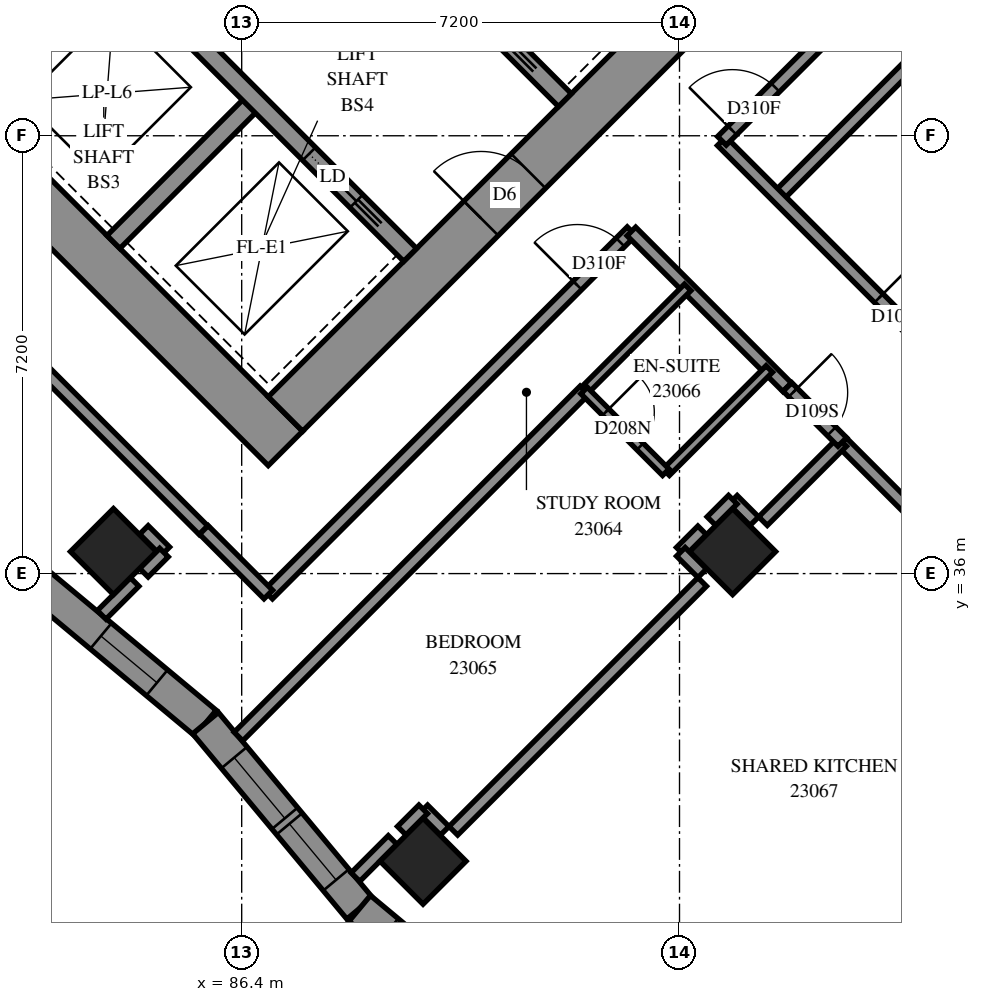
"""IFC4 building model, lengths in metres.
Left out: names, types, materials, properties, quantities, classifications, styles, units other than length and angle.
Written with IfcOpenShell. Run it as: python <this file> out.ifc"""

import sys

from ifc_helpers import new_model, si_unit, direction, frame, frame_2d, origin, origin_2d, place, context, subcontext, project, spatial, polyline, rectangle, outline, extrude, element, fill, save


model = new_model("IFC4")
c1 = context("Model", 3, precision=1e-05, world=origin(), true_north=direction((0.0, 1.0)))
c2 = subcontext(c1, "Body", "Model", "MODEL_VIEW")
j1 = project(units=[si_unit("LENGTHUNIT", "METRE"), si_unit("PLANEANGLEUNIT", "RADIAN")], contexts=[c1])
p1 = place(None, origin())
s1 = spatial("IfcSite", under=j1, at=p1, CompositionType="ELEMENT")
p2 = place(p1, origin())
s2 = spatial("IfcBuilding", under=s1, at=p2, CompositionType="ELEMENT")
p3 = place(p2, frame((0.0, 0.0, 88.0)))
s3 = spatial("IfcBuildingStorey", under=s2, at=p3, CompositionType="ELEMENT", Elevation=88.0)
for number, where, z_axis, x_axis in (
    (1, (84.291, 36.362, 0.0), (0.0, 0.0, 1.0), (0.707, -0.707, 0.0)),
    (2, (94.474, 36.362, 0.0), (0.0, 0.0, 1.0), (0.707, -0.707, 0.0)),
    (3, (89.382, 31.271, 0.0), (0.0, 0.0, 1.0), (0.707, -0.707, 0.0)),
):
    element("IfcColumn", number, at=place(p3, frame(where, z_axis=z_axis, x_axis=x_axis)), inside=s3, PredefinedType="COLUMN", context=c2, shape_type="SweptSolid", body=[
        extrude(rectangle(XDim=1.0, YDim=1.0, at=origin_2d()), origin(), (0.0, 0.0, 1.0), 3.1),
    ])
p4 = place(p3, frame((75.806, 49.373, -0.3), z_axis=(0.0, 0.0, 1.0), x_axis=(0.7071067812, -0.7071067812, 0.0)))
e4 = element("IfcWall", 4, at=p4, inside=s3, PredefinedType="SHEAR", context=c2, shape_type="SweptSolid", body=[
    extrude(rectangle(XDim=16.0, YDim=0.8, at=frame_2d((8.0, 0.0))), origin(), (0.0, 0.0, 1.0), 2.7),
])
p5 = place(p3, frame((87.12, 38.625, -0.3), z_axis=(0.0, 0.0, 1.0), x_axis=(0.7071067812, 0.7071067812, 0.0)))
e5 = element("IfcWall", 5, at=p5, inside=s3, PredefinedType="SHEAR", context=c2, shape_type="SweptSolid", body=[
    extrude(rectangle(XDim=14.4, YDim=0.8, at=frame_2d((7.2, 0.0))), origin(), (0.0, 0.0, 1.0), 2.7),
])
p6 = place(p5, frame((4.55, 0.0, 0.3)))
e6 = element("IfcOpeningElement", 6, at=p6, cuts=e5, PredefinedType="OPENING", context=c2, shape_type="SweptSolid", body=[
    extrude(rectangle(XDim=1.1, YDim=2.1, at=frame_2d((0.55, 1.05))), frame((0.0, 0.41, 0.0), z_axis=(0.0, -1.0, 0.0), x_axis=(1.0, 0.0, 0.0)), (0.0, 0.0, 1.0), 0.82),
])
p7 = place(p5, frame((11.35, 0.0, 0.3)))
e7 = element("IfcOpeningElement", 7, at=p7, cuts=e5, PredefinedType="OPENING", context=c2, shape_type="SweptSolid", body=[
    extrude(rectangle(XDim=1.1, YDim=2.1, at=frame_2d((0.55, 1.05))), frame((0.0, 0.41, 0.0), z_axis=(0.0, -1.0, 0.0), x_axis=(1.0, 0.0, 0.0)), (0.0, 0.0, 1.0), 0.82),
])
for number, where, z_axis, x_axis in (
    (8, (81.746, 43.999, 0.0), (0.0, 0.0, 1.0), (0.707, 0.707, 0.0)),
    (9, (84.291, 41.453, 0.0), (0.0, 0.0, 1.0), (0.707, 0.707, 0.0)),
):
    element("IfcWall", number, at=place(p3, frame(where, z_axis=z_axis, x_axis=x_axis)), inside=s3, PredefinedType="SOLIDWALL", context=c2, shape_type="SweptSolid", body=[
        extrude(rectangle(XDim=3.3, YDim=0.3, at=frame_2d((1.65, 0.0))), origin(), (0.0, 0.0, 1.0), 3.1),
    ])
p8 = place(p3, frame((78.988, 51.423, 0.0), z_axis=(0.0, 0.0, 1.0), x_axis=(0.7071067812, -0.7071067812, 0.0)))
e10 = element("IfcWall", 10, at=p8, inside=s3, PredefinedType="SOLIDWALL", context=c2, shape_type="SweptSolid", body=[
    extrude(rectangle(XDim=14.4, YDim=0.3, at=frame_2d((7.2, 0.0))), origin(), (0.0, 0.0, 1.0), 3.1),
])
p9 = place(p8, frame((1.25, 0.0, 0.0)))
e11 = element("IfcOpeningElement", 11, at=p9, cuts=e10, PredefinedType="OPENING", context=c2, shape_type="SweptSolid", body=[
    extrude(rectangle(XDim=1.1, YDim=2.1, at=frame_2d((0.55, 1.05))), frame((0.0, 0.16, 0.0), z_axis=(0.0, -1.0, 0.0), x_axis=(1.0, 0.0, 0.0)), (0.0, 0.0, 1.0), 0.32),
])
p10 = place(p8, frame((4.85, 0.0, 0.0)))
e12 = element("IfcOpeningElement", 12, at=p10, cuts=e10, PredefinedType="OPENING", context=c2, shape_type="SweptSolid", body=[
    extrude(rectangle(XDim=1.1, YDim=2.1, at=frame_2d((0.55, 1.05))), frame((0.0, 0.16, 0.0), z_axis=(0.0, -1.0, 0.0), x_axis=(1.0, 0.0, 0.0)), (0.0, 0.0, 1.0), 0.32),
])
p11 = place(p8, frame((8.45, 0.0, 0.0)))
e13 = element("IfcOpeningElement", 13, at=p11, cuts=e10, PredefinedType="OPENING", context=c2, shape_type="SweptSolid", body=[
    extrude(rectangle(XDim=1.1, YDim=2.1, at=frame_2d((0.55, 1.05))), frame((0.0, 0.16, 0.0), z_axis=(0.0, -1.0, 0.0), x_axis=(1.0, 0.0, 0.0)), (0.0, 0.0, 1.0), 0.32),
])
p12 = place(p8, frame((12.05, 0.0, 0.0)))
e14 = element("IfcOpeningElement", 14, at=p12, cuts=e10, PredefinedType="OPENING", context=c2, shape_type="SweptSolid", body=[
    extrude(rectangle(XDim=1.1, YDim=2.1, at=frame_2d((0.55, 1.05))), frame((0.0, 0.16, 0.0), z_axis=(0.0, -1.0, 0.0), x_axis=(1.0, 0.0, 0.0)), (0.0, 0.0, 1.0), 0.32),
])
p13 = place(p3, frame((81.534, 53.969, 0.0), z_axis=(0.0, 0.0, 1.0), x_axis=(0.707103309, -0.7071102534, 0.0)))
e15 = element("IfcWall", 15, at=p13, inside=s3, PredefinedType="SOLIDWALL", context=c2, shape_type="SweptSolid", body=[
    extrude(rectangle(XDim=14.4, YDim=0.3, at=frame_2d((7.2, 0.0))), origin(), (0.0, 0.0, 1.0), 3.1),
])
p14 = place(p13, frame((12.05, 0.0, 0.0)))
e16 = element("IfcOpeningElement", 16, at=p14, cuts=e15, PredefinedType="OPENING", context=c2, shape_type="SweptSolid", body=[
    extrude(rectangle(XDim=1.1, YDim=2.1, at=frame_2d((0.55, 1.05))), frame((0.0, 0.16, 0.0), z_axis=(0.0, -1.0, 0.0), x_axis=(1.0, 0.0, 0.0)), (0.0, 0.0, 1.0), 0.32),
])
p15 = place(p3, frame((82.759, 36.077, 0.0), z_axis=(0.0, 0.0, 1.0), x_axis=(0.7685810075, -0.6397524794, 0.0)))
e17 = element("IfcWall", 17, at=p15, inside=s3, PredefinedType="SOLIDWALL", context=c2, shape_type="SweptSolid", body=[
    extrude(outline(polyline([(-0.025, -0.275), (3.938, -0.275), (3.989, 0.275), (0.025, 0.275), (-0.025, -0.275)])), origin(), (0.0, 0.0, 1.0), 3.1),
])
p16 = place(p15, frame((1.724, 0.0, 0.5)))
e18 = element("IfcOpeningElement", 18, at=p16, cuts=e17, PredefinedType="OPENING", context=c2, shape_type="SweptSolid", body=[
    extrude(rectangle(XDim=1.2, YDim=2.45, at=frame_2d((0.6, 1.225))), frame((0.0, 0.285, 0.0), z_axis=(0.0, -1.0, 0.0), x_axis=(1.0, 0.0, 0.0)), (0.0, 0.0, 1.0), 0.57),
])
p17 = place(p3, frame((85.805, 33.541, 0.0), z_axis=(0.0, 0.0, 1.0), x_axis=(0.6397524794, -0.7685810075, 0.0)))
e19 = element("IfcWall", 19, at=p17, inside=s3, PredefinedType="SOLIDWALL", context=c2, shape_type="SweptSolid", body=[
    extrude(outline(polyline([(0.025, -0.275), (3.989, -0.275), (3.938, 0.275), (-0.025, 0.275), (0.025, -0.275)])), origin(), (0.0, 0.0, 1.0), 3.1),
])
p18 = place(p17, frame((0.738, 0.0, 0.5)))
e20 = element("IfcOpeningElement", 20, at=p18, cuts=e19, PredefinedType="OPENING", context=c2, shape_type="SweptSolid", body=[
    extrude(rectangle(XDim=1.3, YDim=2.45, at=frame_2d((0.65, 1.225))), frame((0.0, 0.285, 0.0), z_axis=(0.0, -1.0, 0.0), x_axis=(1.0, 0.0, 0.0)), (0.0, 0.0, 1.0), 0.57),
])
p19 = place(p17, frame((2.155, 0.0, 0.5)))
e21 = element("IfcOpeningElement", 21, at=p19, cuts=e19, PredefinedType="OPENING", context=c2, shape_type="SweptSolid", body=[
    extrude(rectangle(XDim=1.2, YDim=2.45, at=frame_2d((0.6, 1.225))), frame((0.0, 0.285, 0.0), z_axis=(0.0, -1.0, 0.0), x_axis=(1.0, 0.0, 0.0)), (0.0, 0.0, 1.0), 0.57),
])
p20 = place(p3, frame((88.341, 30.495, 0.0), z_axis=(0.0, 0.0, 1.0), x_axis=(0.7685810075, -0.6397524794, 0.0)))
e22 = element("IfcWall", 22, at=p20, inside=s3, PredefinedType="SOLIDWALL", context=c2, shape_type="SweptSolid", body=[
    extrude(outline(polyline([(-0.025, -0.275), (3.938, -0.275), (3.989, 0.275), (0.025, 0.275), (-0.025, -0.275)])), origin(), (0.0, 0.0, 1.0), 3.1),
])
p21 = place(p20, frame((0.594, 0.0, 0.5)))
e23 = element("IfcOpeningElement", 23, at=p21, cuts=e22, PredefinedType="OPENING", context=c2, shape_type="SweptSolid", body=[
    extrude(rectangle(XDim=1.3, YDim=2.45, at=frame_2d((0.65, 1.225))), frame((0.0, 0.285, 0.0), z_axis=(0.0, -1.0, 0.0), x_axis=(1.0, 0.0, 0.0)), (0.0, 0.0, 1.0), 0.57),
])
p22 = place(p20, frame((2.094, 0.0, 0.5)))
e24 = element("IfcOpeningElement", 24, at=p22, cuts=e22, PredefinedType="OPENING", context=c2, shape_type="SweptSolid", body=[
    extrude(rectangle(XDim=1.3, YDim=2.45, at=frame_2d((0.65, 1.225))), frame((0.0, 0.285, 0.0), z_axis=(0.0, -1.0, 0.0), x_axis=(1.0, 0.0, 0.0)), (0.0, 0.0, 1.0), 0.57),
])
p23 = place(p3, frame((95.215, 42.197, 0.0), z_axis=(0.0, 0.0, 1.0), x_axis=(0.7071067812, 0.7071067812, 0.0)))
e25 = element("IfcWall", 25, at=p23, inside=s3, PredefinedType="PARTITIONING", context=c2, shape_type="SweptSolid", body=[
    extrude(rectangle(XDim=10.675, YDim=0.2, at=frame_2d((5.338, 0.0))), origin(), (0.0, 0.0, 1.0), 3.1),
])
p24 = place(p3, frame((94.294, 43.111, 0.0), z_axis=(0.0, 0.0, 1.0), x_axis=(0.7071067812, -0.7071067812, 0.0)))
e26 = element("IfcWall", 26, at=p24, inside=s3, PredefinedType="PARTITIONING", context=c2, shape_type="SweptSolid", body=[
    extrude(rectangle(XDim=8.499, YDim=0.2, at=frame_2d((4.25, 0.0))), origin(), (0.0, 0.0, 1.0), 3.1),
])
p25 = place(p24, frame((3.651, 0.0, 0.0)))
e27 = element("IfcOpeningElement", 27, at=p25, cuts=e26, PredefinedType="OPENING", context=c2, shape_type="SweptSolid", body=[
    extrude(rectangle(XDim=0.9, YDim=2.1, at=frame_2d((0.45, 1.05))), frame((0.0, 0.11, 0.0), z_axis=(0.0, -1.0, 0.0), x_axis=(1.0, 0.0, 0.0)), (0.0, 0.0, 1.0), 0.22),
])
p26 = place(p3, frame((86.835, 35.655, 0.0), z_axis=(0.0, 0.0, 1.0), x_axis=(0.7071067812, 0.7071067812, 0.0)))
e28 = element("IfcWall", 28, at=p26, inside=s3, PredefinedType="PARTITIONING", context=c2, shape_type="SweptSolid", body=[
    extrude(rectangle(XDim=8.451, YDim=0.2, at=frame_2d((4.226, 0.0))), origin(), (0.0, 0.0, 1.0), 3.1),
])
p27 = place(p26, frame((7.192, 0.0, 0.0)))
e29 = element("IfcOpeningElement", 29, at=p27, cuts=e28, PredefinedType="OPENING", context=c2, shape_type="SweptSolid", body=[
    extrude(rectangle(XDim=1.0, YDim=2.1, at=frame_2d((0.5, 1.05))), frame((0.0, 0.11, 0.0), z_axis=(0.0, -1.0, 0.0), x_axis=(1.0, 0.0, 0.0)), (0.0, 0.0, 1.0), 0.22),
])
p28 = place(p3, frame((94.297, 43.117, 0.0), z_axis=(0.0, 0.0, 1.0), x_axis=(0.7071067812, 0.7071067812, 0.0)))
e30 = element("IfcWall", 30, at=p28, inside=s3, PredefinedType="PARTITIONING", context=c2, shape_type="SweptSolid", body=[
    extrude(rectangle(XDim=8.448, YDim=0.2, at=frame_2d((4.224, 0.0))), origin(), (0.0, 0.0, 1.0), 3.1),
])
p29 = place(p28, frame((0.242, 0.0, 0.0)))
e31 = element("IfcOpeningElement", 31, at=p29, cuts=e30, PredefinedType="OPENING", context=c2, shape_type="SweptSolid", body=[
    extrude(rectangle(XDim=1.0, YDim=2.1, at=frame_2d((0.5, 1.05))), frame((0.0, 0.11, 0.0), z_axis=(0.0, -1.0, 0.0), x_axis=(1.0, 0.0, 0.0)), (0.0, 0.0, 1.0), 0.22),
])
p30 = place(p3, frame((86.347, 33.321, 0.0), z_axis=(0.0, 0.0, 1.0), x_axis=(0.706982505, 0.7072310356, 0.0)))
e32 = element("IfcWall", 32, at=p30, inside=s3, PredefinedType="PARTITIONING", context=c2, shape_type="SweptSolid", body=[
    extrude(rectangle(XDim=8.047, YDim=0.2, at=frame_2d((4.024, 0.0))), origin(), (0.0, 0.0, 1.0), 3.1),
])
p31 = place(p3, frame((80.948, 41.536, 0.0), z_axis=(0.0, 0.0, 1.0), x_axis=(0.7071067812, -0.7071067812, 0.0)))
e33 = element("IfcWall", 33, at=p31, inside=s3, PredefinedType="PARTITIONING", context=c2, shape_type="SweptSolid", body=[
    extrude(rectangle(XDim=6.822, YDim=0.2, at=frame_2d((3.411, 0.0))), origin(), (0.0, 0.0, 1.0), 3.1),
])
p32 = place(p3, frame((89.881, 31.771, 0.0), z_axis=(0.0, 0.0, 1.0), x_axis=(0.7071067812, 0.7071067812, 0.0)))
e34 = element("IfcWall", 34, at=p32, inside=s3, PredefinedType="PARTITIONING", context=c2, shape_type="SweptSolid", body=[
    extrude(rectangle(XDim=5.787, YDim=0.2, at=frame_2d((2.893, 0.0))), origin(), (0.0, 0.0, 1.0), 3.1),
])
p33 = place(p3, frame((94.973, 26.681, 0.0), z_axis=(0.0, 0.0, 1.0), x_axis=(0.7071067812, 0.7071067812, 0.0)))
e35 = element("IfcWall", 35, at=p33, inside=s3, PredefinedType="PARTITIONING", context=c2, shape_type="SweptSolid", body=[
    extrude(rectangle(XDim=5.784, YDim=0.2, at=frame_2d((2.892, 0.0))), origin(), (0.0, 0.0, 1.0), 3.1),
])
p34 = place(p3, frame((92.809, 41.627, 0.0), z_axis=(0.0, 0.0, 1.0), x_axis=(0.7071067812, -0.7071067812, 0.0)))
e36 = element("IfcWall", 36, at=p34, inside=s3, PredefinedType="PARTITIONING", context=c2, shape_type="SweptSolid", body=[
    extrude(rectangle(XDim=3.623, YDim=0.2, at=frame_2d((1.812, 0.0))), origin(), (0.0, 0.0, 1.0), 3.1),
])
p35 = place(p3, frame((96.274, 38.162, 0.0), z_axis=(0.0, 0.0, 1.0), x_axis=(0.7071067812, -0.7071067812, 0.0)))
e37 = element("IfcWall", 37, at=p35, inside=s3, PredefinedType="PARTITIONING", context=c2, shape_type="SweptSolid", body=[
    extrude(rectangle(XDim=3.1, YDim=0.2, at=frame_2d((1.55, 0.0))), origin(), (0.0, 0.0, 1.0), 3.1),
])
for number, where, z_axis, x_axis in (
    (38, (92.037, 39.011, 0.0), (0.0, 0.0, 1.0), (0.708, 0.707, 0.0)),
    (39, (93.381, 37.667, 0.0), (0.0, 0.0, 1.0), (0.707, 0.708, 0.0)),
):
    element("IfcWall", number, at=place(p3, frame(where, z_axis=z_axis, x_axis=x_axis)), inside=s3, PredefinedType="PARTITIONING", context=c2, shape_type="SweptSolid", body=[
        extrude(rectangle(XDim=2.4, YDim=0.15, at=frame_2d((1.2, 0.0))), origin(), (0.0, 0.0, 1.0), 3.1),
    ])
p36 = place(p3, frame((92.031, 39.011, 0.0), z_axis=(0.0, 0.0, 1.0), x_axis=(0.7071067812, -0.7071067812, 0.0)))
e40 = element("IfcWall", 40, at=p36, inside=s3, PredefinedType="PARTITIONING", context=c2, shape_type="SweptSolid", body=[
    extrude(rectangle(XDim=1.901, YDim=0.15, at=frame_2d((0.95, 0.0))), origin(), (0.0, 0.0, 1.0), 3.1),
])
p37 = place(p36, frame((0.502, 0.0, 0.0)))
e41 = element("IfcOpeningElement", 41, at=p37, cuts=e40, PredefinedType="OPENING", context=c2, shape_type="SweptSolid", body=[
    extrude(rectangle(XDim=0.8, YDim=2.1, at=frame_2d((0.4, 1.05))), frame((0.0, 0.085, 0.0), z_axis=(0.0, -1.0, 0.0), x_axis=(1.0, 0.0, 0.0)), (0.0, 0.0, 1.0), 0.17),
])
p38 = place(p3, frame((94.973, 36.863, 0.0), z_axis=(0.0, 0.0, 1.0), x_axis=(0.7071067812, 0.7071067812, 0.0)))
e42 = element("IfcWall", 42, at=p38, inside=s3, PredefinedType="PARTITIONING", context=c2, shape_type="SweptSolid", body=[
    extrude(rectangle(XDim=1.841, YDim=0.2, at=frame_2d((0.921, 0.0))), origin(), (0.0, 0.0, 1.0), 3.1),
])
p39 = place(p3, frame((85.778, 36.718, 0.0), z_axis=(0.0, 0.0, 1.0), x_axis=(0.7064400143, -0.70777292, 0.0)))
e43 = element("IfcWall", 43, at=p39, inside=s3, PredefinedType="PARTITIONING", context=c2, shape_type="SweptSolid", body=[
    extrude(rectangle(XDim=1.5, YDim=0.2, at=frame_2d((0.75, 0.0))), origin(), (0.0, 0.0, 1.0), 3.1),
])
p40 = place(p3, frame((95.375, 39.069, 0.0), z_axis=(0.0, 0.0, 1.0), x_axis=(0.7063232841, -0.7078894111, 0.0)))
e44 = element("IfcWall", 44, at=p40, inside=s3, PredefinedType="PARTITIONING", context=c2, shape_type="SweptSolid", body=[
    extrude(rectangle(XDim=1.277, YDim=0.2, at=frame_2d((0.638, 0.0))), origin(), (0.0, 0.0, 1.0), 3.1),
])
p41 = place(p40, frame((0.129, 0.0, 0.0)))
e45 = element("IfcOpeningElement", 45, at=p41, cuts=e44, PredefinedType="OPENING", context=c2, shape_type="SweptSolid", body=[
    extrude(rectangle(XDim=0.9, YDim=2.1, at=frame_2d((0.45, 1.05))), frame((0.0, 0.11, 0.0), z_axis=(0.0, -1.0, 0.0), x_axis=(1.0, 0.0, 0.0)), (0.0, 0.0, 1.0), 0.22),
])
p42 = place(p3, frame((88.271, 31.009, 0.0), z_axis=(0.0, 0.0, 1.0), x_axis=(0.7071646388, 0.7070489188, 0.0)))
e46 = element("IfcWall", 46, at=p42, inside=s3, PredefinedType="PARTITIONING", context=c2, shape_type="SweptSolid", body=[
    extrude(rectangle(XDim=0.864, YDim=0.2, at=frame_2d((0.432, 0.0))), origin(), (0.0, 0.0, 1.0), 3.1),
])
p43 = place(p3, frame((84.097, 35.321, 0.0), z_axis=(0.0, 0.0, 1.0), x_axis=(0.7071067812, 0.7071067812, 0.0)))
e47 = element("IfcWall", 47, at=p43, inside=s3, PredefinedType="PARTITIONING", context=c2, shape_type="SweptSolid", body=[
    extrude(rectangle(XDim=0.766, YDim=0.2, at=frame_2d((0.383, 0.0))), origin(), (0.0, 0.0, 1.0), 3.1),
])
for number, where, z_axis, x_axis in (
    (48, (84.792, 36.718, 0.0), (0.0, 0.0, 1.0), (0.707, -0.707, 0.0)),
    (49, (93.621, 36.359, 0.0), (0.0, 0.0, 1.0), (0.707, 0.707, 0.0)),
    (50, (89.387, 32.123, 0.0), (0.0, 0.0, 1.0), (0.707, -0.707, 0.0)),
):
    element("IfcWall", number, at=place(p3, frame(where, z_axis=z_axis, x_axis=x_axis)), inside=s3, PredefinedType="PARTITIONING", context=c2, shape_type="SweptSolid", body=[
        extrude(rectangle(XDim=0.498, YDim=0.2, at=frame_2d((0.249, 0.0))), origin(), (0.0, 0.0, 1.0), 3.1),
    ])
p44 = place(p3, frame((84.791, 36.015, 0.0), z_axis=(0.0, 0.0, 1.0), x_axis=(0.7071067812, 0.7071067812, 0.0)))
e51 = element("IfcWall", 51, at=p44, inside=s3, PredefinedType="PARTITIONING", context=c2, shape_type="SweptSolid", body=[
    extrude(rectangle(XDim=0.468, YDim=0.2, at=frame_2d((0.234, 0.0))), origin(), (0.0, 0.0, 1.0), 3.1),
])
for number, where, z_axis, x_axis in (
    (52, (94.478, 37.214, 0.0), (0.0, 0.0, 1.0), (0.707, -0.707, 0.0)),
    (53, (89.033, 31.771, 0.0), (0.0, 0.0, 1.0), (0.707, 0.707, 0.0)),
    (54, (94.125, 36.863, 0.0), (0.0, 0.0, 1.0), (0.707, 0.707, 0.0)),
    (55, (93.622, 36.358, 0.0), (0.0, 0.0, 1.0), (0.707, -0.707, 0.0)),
):
    element("IfcWall", number, at=place(p3, frame(where, z_axis=z_axis, x_axis=x_axis)), inside=s3, PredefinedType="PARTITIONING", context=c2, shape_type="SweptSolid", body=[
        extrude(rectangle(XDim=0.498, YDim=0.2, at=frame_2d((0.249, 0.0))), origin(), (0.0, 0.0, 1.0), 3.1),
    ])
p45 = place(p16, origin())
e56 = element("IfcWindow", 56, at=p45, inside=s3, PartitioningType="SINGLE_PANEL", PredefinedType="WINDOW", context=c2, shape_type="SweptSolid", body=[
    extrude(rectangle(XDim=1.2, YDim=2.45, at=frame_2d((0.6, 1.225))), frame((0.0, 0.155, 0.0), z_axis=(0.0, -1.0, 0.0), x_axis=(1.0, 0.0, 0.0)), (0.0, 0.0, 1.0), 0.06),
])
fill(e18, e56)
p46 = place(p18, origin())
e57 = element("IfcWindow", 57, at=p46, inside=s3, PartitioningType="SINGLE_PANEL", PredefinedType="WINDOW", context=c2, shape_type="SweptSolid", body=[
    extrude(rectangle(XDim=1.3, YDim=2.45, at=frame_2d((0.65, 1.225))), frame((0.0, 0.155, 0.0), z_axis=(0.0, -1.0, 0.0), x_axis=(1.0, 0.0, 0.0)), (0.0, 0.0, 1.0), 0.06),
])
fill(e20, e57)
p47 = place(p6, origin())
e58 = element("IfcDoor", 58, at=p47, inside=s3, OperationType="DOUBLE_DOOR_SINGLE_SWING", PredefinedType="DOOR", context=c2, shape_type="SweptSolid", body=[
    extrude(rectangle(XDim=1.1, YDim=2.1, at=frame_2d((0.55, 1.05))), frame((0.0, 0.025, 0.0), z_axis=(0.0, -1.0, 0.0), x_axis=(1.0, 0.0, 0.0)), (0.0, 0.0, 1.0), 0.05),
])
fill(e6, e58)
p48 = place(p12, origin())
e59 = element("IfcDoor", 59, at=p48, inside=s3, OperationType="SLIDING_TO_RIGHT", PredefinedType="DOOR", context=c2, shape_type="SweptSolid", body=[
    extrude(rectangle(XDim=1.1, YDim=2.1, at=frame_2d((0.55, 1.05))), frame((0.0, 0.025, 0.0), z_axis=(0.0, -1.0, 0.0), x_axis=(1.0, 0.0, 0.0)), (0.0, 0.0, 1.0), 0.05),
])
fill(e14, e59)
p49 = place(p29, origin())
e60 = element("IfcDoor", 60, at=p49, inside=s3, OperationType="SINGLE_SWING_LEFT", PredefinedType="DOOR", context=c2, shape_type="SweptSolid", body=[
    extrude(rectangle(XDim=1.0, YDim=2.1, at=frame_2d((0.5, 1.05))), frame((0.0, 0.025, 0.0), z_axis=(0.0, -1.0, 0.0), x_axis=(1.0, 0.0, 0.0)), (0.0, 0.0, 1.0), 0.05),
])
fill(e31, e60)
p50 = place(p25, origin())
e61 = element("IfcDoor", 61, at=p50, inside=s3, OperationType="SINGLE_SWING_RIGHT", PredefinedType="DOOR", context=c2, shape_type="SweptSolid", body=[
    extrude(rectangle(XDim=0.9, YDim=2.1, at=frame_2d((0.45, 1.05))), frame((0.0, 0.025, 0.0), z_axis=(0.0, -1.0, 0.0), x_axis=(1.0, 0.0, 0.0)), (0.0, 0.0, 1.0), 0.05),
])
fill(e27, e61)
p51 = place(p27, origin())
e62 = element("IfcDoor", 62, at=p51, inside=s3, OperationType="SINGLE_SWING_RIGHT", PredefinedType="DOOR", context=c2, shape_type="SweptSolid", body=[
    extrude(rectangle(XDim=1.0, YDim=2.1, at=frame_2d((0.5, 1.05))), frame((0.0, 0.025, 0.0), z_axis=(0.0, -1.0, 0.0), x_axis=(1.0, 0.0, 0.0)), (0.0, 0.0, 1.0), 0.05),
])
fill(e29, e62)
p52 = place(p41, origin())
e63 = element("IfcDoor", 63, at=p52, inside=s3, OperationType="SINGLE_SWING_LEFT", PredefinedType="DOOR", context=c2, shape_type="SweptSolid", body=[
    extrude(rectangle(XDim=0.9, YDim=2.1, at=frame_2d((0.45, 1.05))), frame((0.0, 0.025, 0.0), z_axis=(0.0, -1.0, 0.0), x_axis=(1.0, 0.0, 0.0)), (0.0, 0.0, 1.0), 0.05),
])
fill(e45, e63)
p53 = place(p37, origin())
e64 = element("IfcDoor", 64, at=p53, inside=s3, OperationType="SINGLE_SWING_RIGHT", PredefinedType="DOOR", context=c2, shape_type="SweptSolid", body=[
    extrude(rectangle(XDim=0.8, YDim=2.1, at=frame_2d((0.4, 1.05))), frame((0.0, 0.025, 0.0), z_axis=(0.0, -1.0, 0.0), x_axis=(1.0, 0.0, 0.0)), (0.0, 0.0, 1.0), 0.05),
])
fill(e41, e64)
p54 = place(p19, origin())
e65 = element("IfcWindow", 65, at=p54, inside=s3, PartitioningType="SINGLE_PANEL", PredefinedType="WINDOW", context=c2, shape_type="SweptSolid", body=[
    extrude(rectangle(XDim=1.2, YDim=2.45, at=frame_2d((0.6, 1.225))), frame((0.0, 0.155, 0.0), z_axis=(0.0, -1.0, 0.0), x_axis=(1.0, 0.0, 0.0)), (0.0, 0.0, 1.0), 0.06),
])
fill(e21, e65)
save(model, sys.argv[1])
